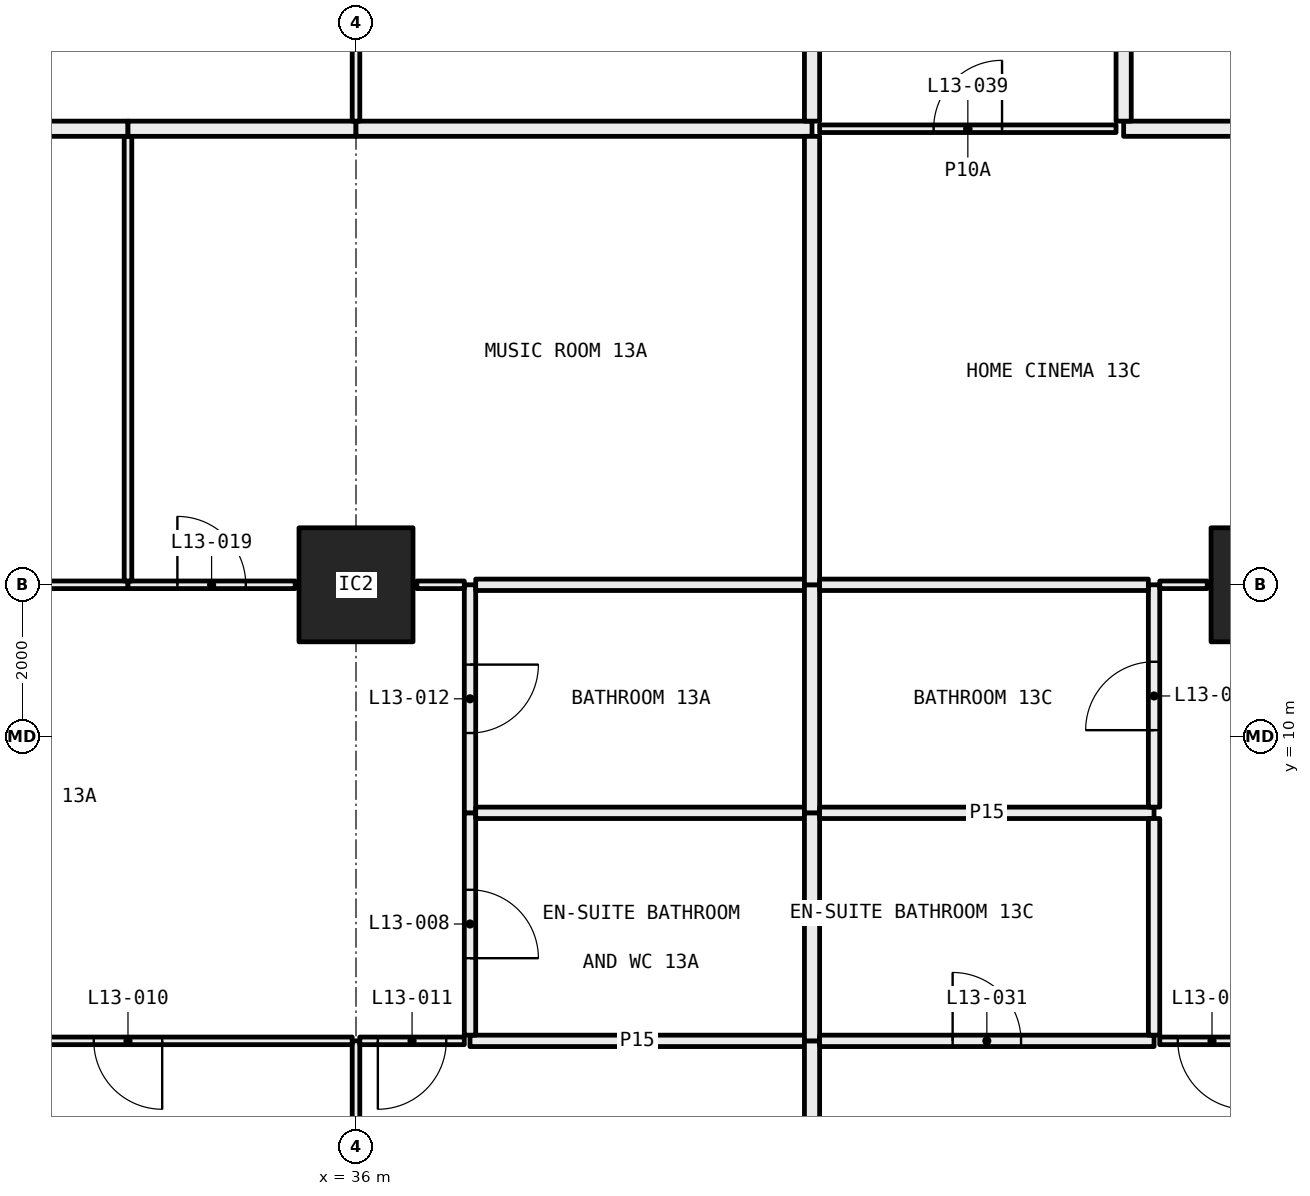
"""IFC4 building model, lengths in metres.
Left out: names, types, materials, properties, quantities, classifications, styles, units other than length and angle.
Written with IfcOpenShell. Run it as: python <this file> out.ifc"""

import sys

from ifc_helpers import new_model, si_unit, direction, frame, frame_2d, origin, origin_2d, place, context, subcontext, project, spatial, rectangle, hollow_rectangle, extrude, element, fill, save


model = new_model("IFC4")
c1 = context("Model", 3, precision=1e-05, world=origin(), true_north=direction((0.0, 1.0)))
c2 = subcontext(c1, "Body", "Model", "MODEL_VIEW")
j1 = project(units=[si_unit("LENGTHUNIT", "METRE"), si_unit("PLANEANGLEUNIT", "RADIAN")], contexts=[c1])
p1 = place(None, origin())
s1 = spatial("IfcSite", under=j1, at=p1, CompositionType="ELEMENT")
p2 = place(p1, origin())
s2 = spatial("IfcBuilding", under=s1, at=p2, CompositionType="ELEMENT")
p3 = place(p2, frame((0.0, 0.0, 57.6)))
s3 = spatial("IfcBuildingStorey", under=s2, at=p3, CompositionType="ELEMENT", Elevation=57.6)
for number, where, z_axis, x_axis in (
    (1, (36.0, 12.0, 0.0), (0.0, 0.0, 1.0), (1.0, 0.0, 0.0)),
    (2, (48.0, 12.0, 0.0), (0.0, 0.0, 1.0), (1.0, 0.0, 0.0)),
):
    element("IfcColumn", number, at=place(p3, frame(where, z_axis=z_axis, x_axis=x_axis)), inside=s3, PredefinedType="COLUMN", context=c2, shape_type="SweptSolid", body=[
        extrude(hollow_rectangle(XDim=1.5, YDim=1.5, WallThickness=0.065, at=origin_2d()), origin(), (0.0, 0.0, 1.0), 3.05),
    ])
p4 = place(p3, frame((36.0, 0.72, 0.0), z_axis=(0.0, 0.0, 1.0), x_axis=(0.0, 1.0, 0.0)))
e3 = element("IfcWall", 3, at=p4, inside=s3, PredefinedType="PARTITIONING", context=c2, shape_type="SweptSolid", body=[
    extrude(rectangle(XDim=5.28, YDim=0.1, at=frame_2d((2.64, 0.0))), origin(), (0.0, 0.0, 1.0), 2.45),
])
p5 = place(p3, frame((35.95, 6.0, 0.0), z_axis=(0.0, 0.0, 1.0), x_axis=(-1.0, 0.0, 0.0)))
e4 = element("IfcWall", 4, at=p5, inside=s3, PredefinedType="PARTITIONING", context=c2, shape_type="SweptSolid", body=[
    extrude(rectangle(XDim=5.9, YDim=0.1, at=frame_2d((2.95, 0.0))), origin(), (0.0, 0.0, 1.0), 2.45),
])
p6 = place(p5, frame((2.5, 0.0, 0.0)))
e5 = element("IfcOpeningElement", 5, at=p6, cuts=e4, PredefinedType="OPENING", context=c2, shape_type="SweptSolid", body=[
    extrude(rectangle(XDim=0.9, YDim=2.1, at=frame_2d((0.45, 1.05))), frame((0.0, 0.06, 0.0), z_axis=(0.0, -1.0, 0.0), x_axis=(1.0, 0.0, 0.0)), (0.0, 0.0, 1.0), 0.12),
])
p7 = place(p3, frame((37.425, 6.0, 0.0), z_axis=(0.0, 0.0, 1.0), x_axis=(-1.0, 0.0, 0.0)))
e6 = element("IfcWall", 6, at=p7, inside=s3, PredefinedType="PARTITIONING", context=c2, shape_type="SweptSolid", body=[
    extrude(rectangle(XDim=1.375, YDim=0.1, at=frame_2d((0.688, 0.0))), origin(), (0.0, 0.0, 1.0), 2.45),
])
p8 = place(p7, frame((0.238, 0.0, 0.0)))
e7 = element("IfcOpeningElement", 7, at=p8, cuts=e6, PredefinedType="OPENING", context=c2, shape_type="SweptSolid", body=[
    extrude(rectangle(XDim=0.9, YDim=2.1, at=frame_2d((0.45, 1.05))), frame((0.0, 0.06, 0.0), z_axis=(0.0, -1.0, 0.0), x_axis=(1.0, 0.0, 0.0)), (0.0, 0.0, 1.0), 0.12),
])
p9 = place(p3, frame((41.9, 6.0, 0.0), z_axis=(0.0, 0.0, 1.0), x_axis=(-1.0, 0.0, 0.0)))
e8 = element("IfcWall", 8, at=p9, inside=s3, PredefinedType="PARTITIONING", context=c2, shape_type="SweptSolid", body=[
    extrude(rectangle(XDim=4.4, YDim=0.15, at=frame_2d((2.2, 0.0))), origin(), (0.0, 0.0, 1.0), 3.05),
])
p10 = place(p3, frame((42.0, 0.72, 0.0), z_axis=(0.0, 0.0, 1.0), x_axis=(0.0, 1.0, 0.0)))
e9 = element("IfcWall", 9, at=p10, inside=s3, PredefinedType="PARTITIONING", context=c2, shape_type="SweptSolid", body=[
    extrude(rectangle(XDim=5.28, YDim=0.2, at=frame_2d((2.64, 0.0))), origin(), (0.0, 0.0, 1.0), 3.05),
])
p11 = place(p3, frame((37.5, 6.075, 0.0), z_axis=(0.0, 0.0, 1.0), x_axis=(0.0, 1.0, 0.0)))
e10 = element("IfcWall", 10, at=p11, inside=s3, PredefinedType="PARTITIONING", context=c2, shape_type="SweptSolid", body=[
    extrude(rectangle(XDim=2.925, YDim=0.15, at=frame_2d((1.462, 0.0))), origin(), (0.0, 0.0, 1.0), 3.05),
])
p12 = place(p11, frame((1.012, 0.0, 0.0)))
e11 = element("IfcOpeningElement", 11, at=p12, cuts=e10, PredefinedType="OPENING", context=c2, shape_type="SweptSolid", body=[
    extrude(rectangle(XDim=0.9, YDim=2.1, at=frame_2d((0.45, 1.05))), frame((0.0, 0.085, 0.0), z_axis=(0.0, -1.0, 0.0), x_axis=(1.0, 0.0, 0.0)), (0.0, 0.0, 1.0), 0.17),
])
p13 = place(p3, frame((37.5, 9.0, 0.0), z_axis=(0.0, 0.0, 1.0), x_axis=(0.0, 1.0, 0.0)))
e12 = element("IfcWall", 12, at=p13, inside=s3, PredefinedType="PARTITIONING", context=c2, shape_type="SweptSolid", body=[
    extrude(rectangle(XDim=3.0, YDim=0.15, at=frame_2d((1.5, 0.0))), origin(), (0.0, 0.0, 1.0), 2.45),
])
p14 = place(p13, frame((1.05, 0.0, 0.0)))
e13 = element("IfcOpeningElement", 13, at=p14, cuts=e12, PredefinedType="OPENING", context=c2, shape_type="SweptSolid", body=[
    extrude(rectangle(XDim=0.9, YDim=2.1, at=frame_2d((0.45, 1.05))), frame((0.0, 0.085, 0.0), z_axis=(0.0, -1.0, 0.0), x_axis=(1.0, 0.0, 0.0)), (0.0, 0.0, 1.0), 0.17),
])
p15 = place(p3, frame((33.0, 12.0, 0.0), z_axis=(0.0, 0.0, 1.0), x_axis=(-1.0, 0.0, 0.0)))
e14 = element("IfcWall", 14, at=p15, inside=s3, PredefinedType="PARTITIONING", context=c2, shape_type="SweptSolid", body=[
    extrude(rectangle(XDim=4.645, YDim=0.1, at=frame_2d((2.323, 0.0))), origin(), (0.0, 0.0, 1.0), 2.45),
])
p16 = place(p3, frame((35.2, 12.0, 0.0), z_axis=(0.0, 0.0, 1.0), x_axis=(-1.0, 0.0, 0.0)))
e15 = element("IfcWall", 15, at=p16, inside=s3, PredefinedType="PARTITIONING", context=c2, shape_type="SweptSolid", body=[
    extrude(rectangle(XDim=2.2, YDim=0.1, at=frame_2d((1.1, 0.0))), origin(), (0.0, 0.0, 1.0), 2.45),
])
p17 = place(p16, frame((0.65, 0.0, 0.0)))
e16 = element("IfcOpeningElement", 16, at=p17, cuts=e15, PredefinedType="OPENING", context=c2, shape_type="SweptSolid", body=[
    extrude(rectangle(XDim=0.9, YDim=2.1, at=frame_2d((0.45, 1.05))), frame((0.0, 0.06, 0.0), z_axis=(0.0, -1.0, 0.0), x_axis=(1.0, 0.0, 0.0)), (0.0, 0.0, 1.0), 0.12),
])
p18 = place(p3, frame((37.425, 12.0, 0.0), z_axis=(0.0, 0.0, 1.0), x_axis=(-1.0, 0.0, 0.0)))
e17 = element("IfcWall", 17, at=p18, inside=s3, PredefinedType="PARTITIONING", context=c2, shape_type="SweptSolid", body=[
    extrude(rectangle(XDim=0.625, YDim=0.1, at=frame_2d((0.312, 0.0))), origin(), (0.0, 0.0, 1.0), 2.45),
])
p19 = place(p3, frame((41.9, 9.0, 0.0), z_axis=(0.0, 0.0, 1.0), x_axis=(-1.0, 0.0, 0.0)))
e18 = element("IfcWall", 18, at=p19, inside=s3, PredefinedType="PARTITIONING", context=c2, shape_type="SweptSolid", body=[
    extrude(rectangle(XDim=4.325, YDim=0.15, at=frame_2d((2.163, 0.0))), origin(), (0.0, 0.0, 1.0), 3.05),
])
p20 = place(p3, frame((42.0, 6.0, 0.0), z_axis=(0.0, 0.0, 1.0), x_axis=(0.0, 1.0, 0.0)))
e19 = element("IfcWall", 19, at=p20, inside=s3, PredefinedType="PARTITIONING", context=c2, shape_type="SweptSolid", body=[
    extrude(rectangle(XDim=3.0, YDim=0.2, at=frame_2d((1.5, 0.0))), origin(), (0.0, 0.0, 1.0), 3.05),
])
p21 = place(p3, frame((41.9, 12.0, 0.0), z_axis=(0.0, 0.0, 1.0), x_axis=(-1.0, 0.0, 0.0)))
e20 = element("IfcWall", 20, at=p21, inside=s3, PredefinedType="PARTITIONING", context=c2, shape_type="SweptSolid", body=[
    extrude(rectangle(XDim=4.325, YDim=0.15, at=frame_2d((2.163, 0.0))), origin(), (0.0, 0.0, 1.0), 2.45),
])
p22 = place(p3, frame((42.0, 9.0, 0.0), z_axis=(0.0, 0.0, 1.0), x_axis=(0.0, 1.0, 0.0)))
e21 = element("IfcWall", 21, at=p22, inside=s3, PredefinedType="PARTITIONING", context=c2, shape_type="SweptSolid", body=[
    extrude(rectangle(XDim=3.0, YDim=0.2, at=frame_2d((1.5, 0.0))), origin(), (0.0, 0.0, 1.0), 2.45),
])
p23 = place(p3, frame((33.0, 12.05, 0.0), z_axis=(0.0, 0.0, 1.0), x_axis=(0.0, 1.0, 0.0)))
e22 = element("IfcWall", 22, at=p23, inside=s3, PredefinedType="PARTITIONING", context=c2, shape_type="SweptSolid", body=[
    extrude(rectangle(XDim=5.85, YDim=0.1, at=frame_2d((2.925, 0.0))), origin(), (0.0, 0.0, 1.0), 2.45),
])
p24 = place(p3, frame((33.0, 18.0, 0.0), z_axis=(0.0, 0.0, 1.0), x_axis=(-1.0, 0.0, 0.0)))
e23 = element("IfcWall", 23, at=p24, inside=s3, PredefinedType="PARTITIONING", context=c2, shape_type="SweptSolid", body=[
    extrude(rectangle(XDim=7.1, YDim=0.2, at=frame_2d((3.55, 0.0))), origin(), (0.0, 0.0, 1.0), 3.05),
])
p25 = place(p3, frame((36.0, 18.0, 0.0), z_axis=(0.0, 0.0, 1.0), x_axis=(-1.0, 0.0, 0.0)))
e24 = element("IfcWall", 24, at=p25, inside=s3, PredefinedType="PARTITIONING", context=c2, shape_type="SweptSolid", body=[
    extrude(rectangle(XDim=3.0, YDim=0.2, at=frame_2d((1.5, 0.0))), origin(), (0.0, 0.0, 1.0), 2.45),
])
p26 = place(p3, frame((42.0, 18.0, 0.0), z_axis=(0.0, 0.0, 1.0), x_axis=(-1.0, 0.0, 0.0)))
e25 = element("IfcWall", 25, at=p26, inside=s3, PredefinedType="PARTITIONING", context=c2, shape_type="SweptSolid", body=[
    extrude(rectangle(XDim=6.0, YDim=0.2, at=frame_2d((3.0, 0.0))), origin(), (0.0, 0.0, 1.0), 2.45),
])
p27 = place(p3, frame((42.0, 12.0, 0.0), z_axis=(0.0, 0.0, 1.0), x_axis=(0.0, 1.0, 0.0)))
e26 = element("IfcWall", 26, at=p27, inside=s3, PredefinedType="PARTITIONING", context=c2, shape_type="SweptSolid", body=[
    extrude(rectangle(XDim=5.9, YDim=0.2, at=frame_2d((2.95, 0.0))), origin(), (0.0, 0.0, 1.0), 2.45),
])
p28 = place(p3, frame((36.0, 18.1, 0.0), z_axis=(0.0, 0.0, 1.0), x_axis=(0.0, 1.0, 0.0)))
e27 = element("IfcWall", 27, at=p28, inside=s3, PredefinedType="PARTITIONING", context=c2, shape_type="SweptSolid", body=[
    extrude(rectangle(XDim=5.1, YDim=0.1, at=frame_2d((2.55, 0.0))), origin(), (0.0, 0.0, 1.0), 2.45),
])
p29 = place(p28, frame((2.1, 0.0, 0.0)))
e28 = element("IfcOpeningElement", 28, at=p29, cuts=e27, PredefinedType="OPENING", context=c2, shape_type="SweptSolid", body=[
    extrude(rectangle(XDim=0.9, YDim=2.1, at=frame_2d((0.45, 1.05))), frame((0.0, 0.06, 0.0), z_axis=(0.0, -1.0, 0.0), x_axis=(1.0, 0.0, 0.0)), (0.0, 0.0, 1.0), 0.12),
])
p30 = place(p3, frame((42.0, 18.1, 0.0), z_axis=(0.0, 0.0, 1.0), x_axis=(0.0, 1.0, 0.0)))
e29 = element("IfcWall", 29, at=p30, inside=s3, PredefinedType="PARTITIONING", context=c2, shape_type="SweptSolid", body=[
    extrude(rectangle(XDim=6.2, YDim=0.2, at=frame_2d((3.1, 0.0))), origin(), (0.0, 0.0, 1.0), 2.45),
])
p31 = place(p3, frame((46.5, 6.0, 0.0), z_axis=(0.0, 0.0, 1.0), x_axis=(-1.0, 0.0, 0.0)))
e30 = element("IfcWall", 30, at=p31, inside=s3, PredefinedType="PARTITIONING", context=c2, shape_type="SweptSolid", body=[
    extrude(rectangle(XDim=4.4, YDim=0.15, at=frame_2d((2.2, 0.0))), origin(), (0.0, 0.0, 1.0), 3.05),
])
p32 = place(p31, frame((1.75, 0.0, 0.0)))
e31 = element("IfcOpeningElement", 31, at=p32, cuts=e30, PredefinedType="OPENING", context=c2, shape_type="SweptSolid", body=[
    extrude(rectangle(XDim=0.9, YDim=2.1, at=frame_2d((0.45, 1.05))), frame((0.0, 0.085, 0.0), z_axis=(0.0, -1.0, 0.0), x_axis=(1.0, 0.0, 0.0)), (0.0, 0.0, 1.0), 0.17),
])
p33 = place(p3, frame((47.95, 6.0, 0.0), z_axis=(0.0, 0.0, 1.0), x_axis=(-1.0, 0.0, 0.0)))
e32 = element("IfcWall", 32, at=p33, inside=s3, PredefinedType="PARTITIONING", context=c2, shape_type="SweptSolid", body=[
    extrude(rectangle(XDim=1.375, YDim=0.1, at=frame_2d((0.688, 0.0))), origin(), (0.0, 0.0, 1.0), 2.45),
])
p34 = place(p33, frame((0.238, 0.0, 0.0)))
e33 = element("IfcOpeningElement", 33, at=p34, cuts=e32, PredefinedType="OPENING", context=c2, shape_type="SweptSolid", body=[
    extrude(rectangle(XDim=0.9, YDim=2.1, at=frame_2d((0.45, 1.05))), frame((0.0, 0.06, 0.0), z_axis=(0.0, -1.0, 0.0), x_axis=(1.0, 0.0, 0.0)), (0.0, 0.0, 1.0), 0.12),
])
p35 = place(p3, frame((46.5, 9.0, 0.0), z_axis=(0.0, 0.0, 1.0), x_axis=(-1.0, 0.0, 0.0)))
e34 = element("IfcWall", 34, at=p35, inside=s3, PredefinedType="PARTITIONING", context=c2, shape_type="SweptSolid", body=[
    extrude(rectangle(XDim=4.4, YDim=0.15, at=frame_2d((2.2, 0.0))), origin(), (0.0, 0.0, 1.0), 3.05),
])
p36 = place(p3, frame((46.5, 6.075, 0.0), z_axis=(0.0, 0.0, 1.0), x_axis=(0.0, 1.0, 0.0)))
e35 = element("IfcWall", 35, at=p36, inside=s3, PredefinedType="PARTITIONING", context=c2, shape_type="SweptSolid", body=[
    extrude(rectangle(XDim=2.85, YDim=0.15, at=frame_2d((1.425, 0.0))), origin(), (0.0, 0.0, 1.0), 3.05),
])
p37 = place(p3, frame((46.5, 9.075, 0.0), z_axis=(0.0, 0.0, 1.0), x_axis=(0.0, 1.0, 0.0)))
e36 = element("IfcWall", 36, at=p37, inside=s3, PredefinedType="PARTITIONING", context=c2, shape_type="SweptSolid", body=[
    extrude(rectangle(XDim=2.925, YDim=0.15, at=frame_2d((1.462, 0.0))), origin(), (0.0, 0.0, 1.0), 2.45),
])
p38 = place(p37, frame((1.012, 0.0, 0.0)))
e37 = element("IfcOpeningElement", 37, at=p38, cuts=e36, PredefinedType="OPENING", context=c2, shape_type="SweptSolid", body=[
    extrude(rectangle(XDim=0.9, YDim=2.1, at=frame_2d((0.45, 1.05))), frame((0.0, 0.085, 0.0), z_axis=(0.0, -1.0, 0.0), x_axis=(1.0, 0.0, 0.0)), (0.0, 0.0, 1.0), 0.17),
])
p39 = place(p3, frame((46.425, 12.0, 0.0), z_axis=(0.0, 0.0, 1.0), x_axis=(-1.0, 0.0, 0.0)))
e38 = element("IfcWall", 38, at=p39, inside=s3, PredefinedType="PARTITIONING", context=c2, shape_type="SweptSolid", body=[
    extrude(rectangle(XDim=4.325, YDim=0.15, at=frame_2d((2.163, 0.0))), origin(), (0.0, 0.0, 1.0), 2.45),
])
p40 = place(p3, frame((47.2, 12.0, 0.0), z_axis=(0.0, 0.0, 1.0), x_axis=(-1.0, 0.0, 0.0)))
e39 = element("IfcWall", 39, at=p40, inside=s3, PredefinedType="PARTITIONING", context=c2, shape_type="SweptSolid", body=[
    extrude(rectangle(XDim=0.625, YDim=0.1, at=frame_2d((0.312, 0.0))), origin(), (0.0, 0.0, 1.0), 2.45),
])
p41 = place(p3, frame((46.0, 18.0, 0.0), z_axis=(0.0, 0.0, 1.0), x_axis=(-1.0, 0.0, 0.0)))
e40 = element("IfcWall", 40, at=p41, inside=s3, PredefinedType="PARTITIONING", context=c2, shape_type="SweptSolid", body=[
    extrude(rectangle(XDim=3.9, YDim=0.1, at=frame_2d((1.95, 0.0))), origin(), (0.0, 0.0, 1.0), 3.05),
])
p42 = place(p41, frame((1.5, 0.0, 0.0)))
e41 = element("IfcOpeningElement", 41, at=p42, cuts=e40, PredefinedType="OPENING", context=c2, shape_type="SweptSolid", body=[
    extrude(rectangle(XDim=0.9, YDim=2.1, at=frame_2d((0.45, 1.05))), frame((0.0, 0.06, 0.0), z_axis=(0.0, -1.0, 0.0), x_axis=(1.0, 0.0, 0.0)), (0.0, 0.0, 1.0), 0.12),
])
p43 = place(p3, frame((52.5, 18.0, 0.0), z_axis=(0.0, 0.0, 1.0), x_axis=(-1.0, 0.0, 0.0)))
e42 = element("IfcWall", 42, at=p43, inside=s3, PredefinedType="PARTITIONING", context=c2, shape_type="SweptSolid", body=[
    extrude(rectangle(XDim=6.4, YDim=0.2, at=frame_2d((3.2, 0.0))), origin(), (0.0, 0.0, 1.0), 3.05),
])
p44 = place(p3, frame((46.1, 18.1, 0.0), z_axis=(0.0, 0.0, 1.0), x_axis=(0.0, 1.0, 0.0)))
e43 = element("IfcWall", 43, at=p44, inside=s3, PredefinedType="PARTITIONING", context=c2, shape_type="SweptSolid", body=[
    extrude(rectangle(XDim=6.2, YDim=0.2, at=frame_2d((3.1, 0.0))), origin(), (0.0, 0.0, 1.0), 2.45),
])
p45 = place(p12, frame((0.9, 0.0, 0.0), x_axis=(-1.0, 0.0, 0.0)))
e44 = element("IfcDoor", 44, at=p45, inside=s3, OperationType="SINGLE_SWING_LEFT", PredefinedType="DOOR", context=c2, shape_type="SweptSolid", body=[
    extrude(rectangle(XDim=0.9, YDim=2.1, at=frame_2d((0.45, 1.05))), frame((0.0, 0.025, 0.0), z_axis=(0.0, -1.0, 0.0), x_axis=(1.0, 0.0, 0.0)), (0.0, 0.0, 1.0), 0.05),
])
fill(e11, e44)
p46 = place(p6, origin())
e45 = element("IfcDoor", 45, at=p46, inside=s3, OperationType="SINGLE_SWING_RIGHT", PredefinedType="DOOR", context=c2, shape_type="SweptSolid", body=[
    extrude(rectangle(XDim=0.9, YDim=2.1, at=frame_2d((0.45, 1.05))), frame((0.0, 0.025, 0.0), z_axis=(0.0, -1.0, 0.0), x_axis=(1.0, 0.0, 0.0)), (0.0, 0.0, 1.0), 0.05),
])
fill(e5, e45)
p47 = place(p8, origin())
e46 = element("IfcDoor", 46, at=p47, inside=s3, OperationType="SINGLE_SWING_LEFT", PredefinedType="DOOR", context=c2, shape_type="SweptSolid", body=[
    extrude(rectangle(XDim=0.9, YDim=2.1, at=frame_2d((0.45, 1.05))), frame((0.0, 0.025, 0.0), z_axis=(0.0, -1.0, 0.0), x_axis=(1.0, 0.0, 0.0)), (0.0, 0.0, 1.0), 0.05),
])
fill(e7, e46)
p48 = place(p14, frame((0.9, 0.0, 0.0), x_axis=(-1.0, 0.0, 0.0)))
e47 = element("IfcDoor", 47, at=p48, inside=s3, OperationType="SINGLE_SWING_RIGHT", PredefinedType="DOOR", context=c2, shape_type="SweptSolid", body=[
    extrude(rectangle(XDim=0.9, YDim=2.1, at=frame_2d((0.45, 1.05))), frame((0.0, 0.025, 0.0), z_axis=(0.0, -1.0, 0.0), x_axis=(1.0, 0.0, 0.0)), (0.0, 0.0, 1.0), 0.05),
])
fill(e13, e47)
p49 = place(p17, frame((0.9, 0.0, 0.0), x_axis=(-1.0, 0.0, 0.0)))
e48 = element("IfcDoor", 48, at=p49, inside=s3, OperationType="SINGLE_SWING_RIGHT", PredefinedType="DOOR", context=c2, shape_type="SweptSolid", body=[
    extrude(rectangle(XDim=0.9, YDim=2.1, at=frame_2d((0.45, 1.05))), frame((0.0, 0.025, 0.0), z_axis=(0.0, -1.0, 0.0), x_axis=(1.0, 0.0, 0.0)), (0.0, 0.0, 1.0), 0.05),
])
fill(e16, e48)
p50 = place(p34, origin())
e49 = element("IfcDoor", 49, at=p50, inside=s3, OperationType="SINGLE_SWING_RIGHT", PredefinedType="DOOR", context=c2, shape_type="SweptSolid", body=[
    extrude(rectangle(XDim=0.9, YDim=2.1, at=frame_2d((0.45, 1.05))), frame((0.0, 0.025, 0.0), z_axis=(0.0, -1.0, 0.0), x_axis=(1.0, 0.0, 0.0)), (0.0, 0.0, 1.0), 0.05),
])
fill(e33, e49)
p51 = place(p32, frame((0.9, 0.0, 0.0), x_axis=(-1.0, 0.0, 0.0)))
e50 = element("IfcDoor", 50, at=p51, inside=s3, OperationType="SINGLE_SWING_RIGHT", PredefinedType="DOOR", context=c2, shape_type="SweptSolid", body=[
    extrude(rectangle(XDim=0.9, YDim=2.1, at=frame_2d((0.45, 1.05))), frame((0.0, 0.025, 0.0), z_axis=(0.0, -1.0, 0.0), x_axis=(1.0, 0.0, 0.0)), (0.0, 0.0, 1.0), 0.05),
])
fill(e31, e50)
p52 = place(p38, origin())
e51 = element("IfcDoor", 51, at=p52, inside=s3, OperationType="SINGLE_SWING_RIGHT", PredefinedType="DOOR", context=c2, shape_type="SweptSolid", body=[
    extrude(rectangle(XDim=0.9, YDim=2.1, at=frame_2d((0.45, 1.05))), frame((0.0, 0.025, 0.0), z_axis=(0.0, -1.0, 0.0), x_axis=(1.0, 0.0, 0.0)), (0.0, 0.0, 1.0), 0.05),
])
fill(e37, e51)
p53 = place(p42, frame((0.9, 0.0, 0.0), x_axis=(-1.0, 0.0, 0.0)))
e52 = element("IfcDoor", 52, at=p53, inside=s3, OperationType="SINGLE_SWING_LEFT", PredefinedType="DOOR", context=c2, shape_type="SweptSolid", body=[
    extrude(rectangle(XDim=0.9, YDim=2.1, at=frame_2d((0.45, 1.05))), frame((0.0, 0.025, 0.0), z_axis=(0.0, -1.0, 0.0), x_axis=(1.0, 0.0, 0.0)), (0.0, 0.0, 1.0), 0.05),
])
fill(e41, e52)
save(model, sys.argv[1])
